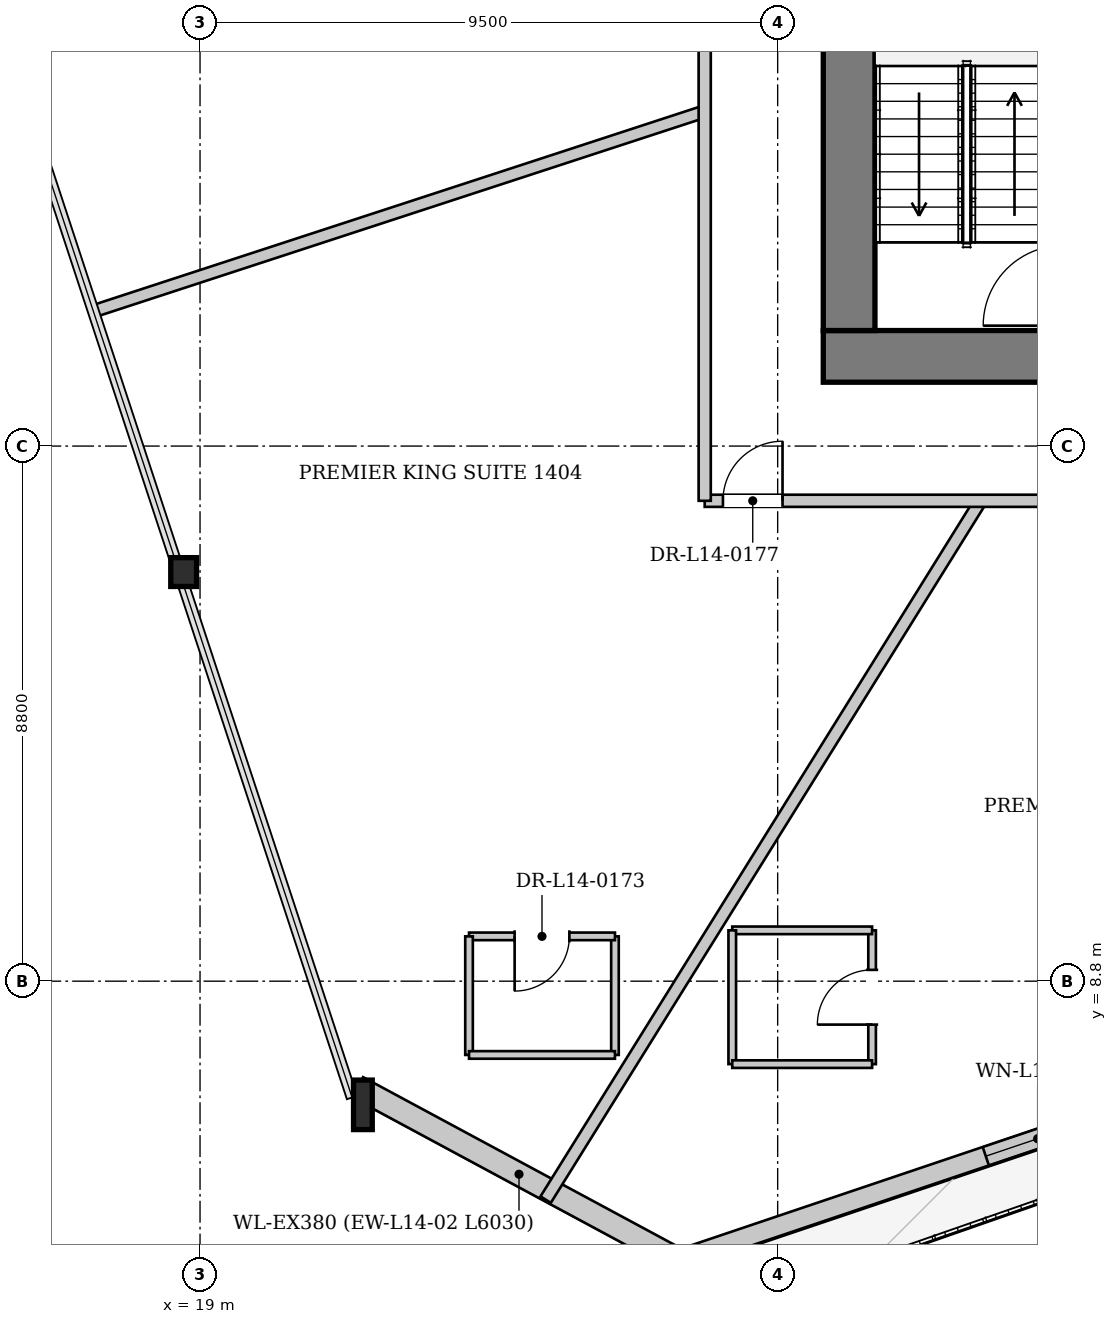
"""IFC4 building model, lengths in metres.
Left out: names, types, materials, properties, quantities, classifications, styles, units other than length and angle.
Written with IfcOpenShell. Run it as: python <this file> out.ifc"""

import sys

from ifc_helpers import new_model, si_unit, direction, frame, frame_2d, origin, origin_2d, place, context, subcontext, project, spatial, rectangle, i_section, extrude, source, transform, mapped, element, fill, save


model = new_model("IFC4")
c1 = context("Model", 3, precision=1e-05, world=origin(), true_north=direction((0.0, 1.0)))
c2 = subcontext(c1, "Body", "Model", "MODEL_VIEW")
j1 = project(units=[si_unit("LENGTHUNIT", "METRE"), si_unit("PLANEANGLEUNIT", "RADIAN")], contexts=[c1])
p1 = place(None, origin())
s1 = spatial("IfcSite", under=j1, at=p1, CompositionType="ELEMENT")
p2 = place(p1, origin())
s2 = spatial("IfcBuilding", under=s1, at=p2, CompositionType="ELEMENT")
p3 = place(p2, frame((0.0, 0.0, 57.7)))
s3 = spatial("IfcBuildingStorey", under=s2, at=p3, CompositionType="ELEMENT", Elevation=57.7)
m1 = source(origin(), c2, "Body", "SweptSolid", [
    extrude(i_section(OverallWidth=0.424, OverallDepth=0.474, WebThickness=0.043, FlangeThickness=0.068, at=origin_2d()), origin(), (0.0, 0.0, 1.0), 3.406),
])
p4 = place(p3, frame((18.609, 15.674, 0.0), z_axis=(0.071104119883, -0.085367950384, 0.993809094939), x_axis=(0.768379900742, 0.639994006328, 0.0)))
e1 = element("IfcColumn", 1, at=p4, inside=s3, PredefinedType="COLUMN", context=c2, shape_type="MappedRepresentation", body=[
    mapped(m1, transform((0.0, 0.0, 0.0), x_axis=(1.0, 0.0, 0.0), y_axis=(0.0, 1.0, 0.0), z_axis=(0.0, 0.0, 1.0), scale=1.0)),
])
m2 = source(origin(), c2, "Body", "SweptSolid", [
    extrude(i_section(OverallWidth=0.308, OverallDepth=0.814, WebThickness=0.021, FlangeThickness=0.04, at=origin_2d()), origin(), (0.0, 0.0, 1.0), 3.412),
])
p5 = place(p3, frame((21.501, 6.887, 0.0), z_axis=(0.103893431056, -0.070764878315, 0.992067783461), x_axis=(0.562948190557, 0.826492186744, 0.0)))
e2 = element("IfcColumn", 2, at=p5, inside=s3, PredefinedType="COLUMN", context=c2, shape_type="MappedRepresentation", body=[
    mapped(m2, transform((0.0, 0.0, 0.0), x_axis=(1.0, 0.0, 0.0), y_axis=(0.0, 1.0, 0.0), z_axis=(0.0, 0.0, 1.0), scale=1.0)),
])
p6 = place(p3, frame((49.898, 11.984, 0.0), z_axis=(0.0, 0.0, 1.0), x_axis=(-0.94755455003, -0.31959407804, 0.0)))
e3 = element("IfcWall", 3, at=p6, inside=s3, PredefinedType="SOLIDWALL", context=c2, shape_type="SweptSolid", body=[
    extrude(rectangle(XDim=24.419, YDim=0.32, at=frame_2d((12.209, 0.0))), origin(), (0.0, 0.0, 1.0), 2.592),
])
p7 = place(p6, frame((7.264, 0.0, 0.0)))
e4 = element("IfcOpeningElement", 4, at=p7, cuts=e3, PredefinedType="OPENING", context=c2, shape_type="SweptSolid", body=[
    extrude(rectangle(XDim=1.1, YDim=2.3, at=frame_2d((0.55, 1.15))), frame((0.0, 0.17, 0.0), z_axis=(0.0, -1.0, 0.0), x_axis=(1.0, 0.0, 0.0)), (0.0, 0.0, 1.0), 0.34),
])
p8 = place(p6, frame((17.17, 0.0, 0.272)))
e5 = element("IfcOpeningElement", 5, at=p8, cuts=e3, PredefinedType="OPENING", context=c2, shape_type="SweptSolid", body=[
    extrude(rectangle(XDim=1.8, YDim=2.2, at=frame_2d((0.9, 1.1))), frame((0.0, 0.17, 0.0), z_axis=(0.0, -1.0, 0.0), x_axis=(1.0, 0.0, 0.0)), (0.0, 0.0, 1.0), 0.34),
])
p9 = place(p3, frame((26.901, 4.196, 0.0), z_axis=(0.0, 0.0, 1.0), x_axis=(-0.880486700223, 0.474070849906, 0.0)))
e6 = element("IfcWall", 6, at=p9, inside=s3, PredefinedType="SOLIDWALL", context=c2, shape_type="SweptSolid", body=[
    extrude(rectangle(XDim=6.03, YDim=0.38, at=frame_2d((3.015, 0.0))), origin(), (0.0, 0.0, 1.0), 2.592),
])
p10 = place(p3, frame((46.75, 19.075, 0.0), z_axis=(0.0, 0.0, 1.0), x_axis=(-1.0, 0.0, 0.0)))
e7 = element("IfcWall", 7, at=p10, inside=s3, PredefinedType="SHEAR", context=c2, shape_type="SweptSolid", body=[
    extrude(rectangle(XDim=17.5, YDim=0.85, at=frame_2d((8.75, 0.0))), origin(), (0.0, 0.0, 1.0), 3.3),
])
p11 = place(p10, frame((4.95, 0.0, 0.0)))
e8 = element("IfcOpeningElement", 8, at=p11, cuts=e7, PredefinedType="OPENING", context=c2, shape_type="SweptSolid", body=[
    extrude(rectangle(XDim=1.12, YDim=2.25, at=frame_2d((0.56, 1.125))), frame((0.0, 0.435, 0.0), z_axis=(0.0, -1.0, 0.0), x_axis=(1.0, 0.0, 0.0)), (0.0, 0.0, 1.0), 0.87),
])
p12 = place(p10, frame((11.45, 0.0, 0.0)))
e9 = element("IfcOpeningElement", 9, at=p12, cuts=e7, PredefinedType="OPENING", context=c2, shape_type="SweptSolid", body=[
    extrude(rectangle(XDim=1.12, YDim=2.25, at=frame_2d((0.56, 1.125))), frame((0.0, 0.435, 0.0), z_axis=(0.0, -1.0, 0.0), x_axis=(1.0, 0.0, 0.0)), (0.0, 0.0, 1.0), 0.87),
])
p13 = place(p3, frame((29.675, 19.5, 0.0), z_axis=(0.0, 0.0, 1.0), x_axis=(0.0, 1.0, 0.0)))
e10 = element("IfcWall", 10, at=p13, inside=s3, PredefinedType="SHEAR", context=c2, shape_type="SweptSolid", body=[
    extrude(rectangle(XDim=14.2, YDim=0.85, at=frame_2d((7.1, 0.0))), origin(), (0.0, 0.0, 1.0), 3.3),
])
p14 = place(p13, frame((7.42, 0.0, 0.0)))
e11 = element("IfcOpeningElement", 11, at=p14, cuts=e10, PredefinedType="OPENING", context=c2, shape_type="SweptSolid", body=[
    extrude(rectangle(XDim=1.6, YDim=2.2, at=frame_2d((0.8, 1.1))), frame((0.0, 0.435, 0.0), z_axis=(0.0, -1.0, 0.0), x_axis=(1.0, 0.0, 0.0)), (0.0, 0.0, 1.0), 0.87),
])
p15 = place(p3, frame((27.3, 23.103, 0.0), z_axis=(0.0, 0.0, 1.0), x_axis=(-0.95051188869, -0.310688186867, 0.0)))
e12 = element("IfcWall", 12, at=p15, inside=s3, PredefinedType="PARTITIONING", context=c2, shape_type="SweptSolid", body=[
    extrude(rectangle(XDim=10.548, YDim=0.2, at=frame_2d((5.274, 0.0))), origin(), (0.0, 0.0, 1.0), 3.3),
])
p16 = place(p3, frame((31.838, 16.7, 0.0), z_axis=(0.0, 0.0, 1.0), x_axis=(-0.528446628654, -0.848966525055, 0.0)))
e13 = element("IfcWall", 13, at=p16, inside=s3, PredefinedType="PARTITIONING", context=c2, shape_type="SweptSolid", body=[
    extrude(rectangle(XDim=13.537, YDim=0.2, at=frame_2d((6.769, 0.0))), origin(), (0.0, 0.0, 1.0), 3.3),
])
p17 = place(p3, frame((25.824, 7.587, 0.0), z_axis=(0.0, 0.0, 1.0), x_axis=(0.0, 1.0, 0.0)))
e14 = element("IfcWall", 14, at=p17, inside=s3, PredefinedType="PARTITIONING", context=c2, shape_type="SweptSolid", body=[
    extrude(rectangle(XDim=1.95, YDim=0.125, at=frame_2d((0.975, 0.0))), origin(), (0.0, 0.0, 1.0), 3.3),
])
p18 = place(p3, frame((25.824, 9.537, 0.0), z_axis=(0.0, 0.0, 1.0), x_axis=(-1.0, 0.0, 0.0)))
e15 = element("IfcWall", 15, at=p18, inside=s3, PredefinedType="PARTITIONING", context=c2, shape_type="SweptSolid", body=[
    extrude(rectangle(XDim=2.4, YDim=0.125, at=frame_2d((1.2, 0.0))), origin(), (0.0, 0.0, 1.0), 3.3),
])
p19 = place(p18, frame((0.75, 0.0, 0.0)))
e16 = element("IfcOpeningElement", 16, at=p19, cuts=e15, PredefinedType="OPENING", context=c2, shape_type="SweptSolid", body=[
    extrude(rectangle(XDim=0.9, YDim=2.1, at=frame_2d((0.45, 1.05))), frame((0.0, 0.073, 0.0), z_axis=(0.0, -1.0, 0.0), x_axis=(1.0, 0.0, 0.0)), (0.0, 0.0, 1.0), 0.145),
])
p20 = place(p3, frame((23.424, 9.537, 0.0), z_axis=(0.0, 0.0, 1.0), x_axis=(0.0, -1.0, 0.0)))
e17 = element("IfcWall", 17, at=p20, inside=s3, PredefinedType="PARTITIONING", context=c2, shape_type="SweptSolid", body=[
    extrude(rectangle(XDim=1.95, YDim=0.125, at=frame_2d((0.975, 0.0))), origin(), (0.0, 0.0, 1.0), 3.3),
])
p21 = place(p3, frame((23.424, 7.587, 0.0), z_axis=(0.0, 0.0, 1.0), x_axis=(1.0, 0.0, 0.0)))
e18 = element("IfcWall", 18, at=p21, inside=s3, PredefinedType="PARTITIONING", context=c2, shape_type="SweptSolid", body=[
    extrude(rectangle(XDim=2.4, YDim=0.125, at=frame_2d((1.2, 0.0))), origin(), (0.0, 0.0, 1.0), 3.3),
])
p22 = place(p3, frame((30.053, 7.436, 0.0), z_axis=(0.0, 0.0, 1.0), x_axis=(0.0, 1.0, 0.0)))
e19 = element("IfcWall", 19, at=p22, inside=s3, PredefinedType="PARTITIONING", context=c2, shape_type="SweptSolid", body=[
    extrude(rectangle(XDim=2.2, YDim=0.125, at=frame_2d((1.1, 0.0))), origin(), (0.0, 0.0, 1.0), 3.3),
])
p23 = place(p22, frame((0.65, 0.0, 0.0)))
e20 = element("IfcOpeningElement", 20, at=p23, cuts=e19, PredefinedType="OPENING", context=c2, shape_type="SweptSolid", body=[
    extrude(rectangle(XDim=0.9, YDim=2.1, at=frame_2d((0.45, 1.05))), frame((0.0, 0.073, 0.0), z_axis=(0.0, -1.0, 0.0), x_axis=(1.0, 0.0, 0.0)), (0.0, 0.0, 1.0), 0.145),
])
p24 = place(p3, frame((30.053, 9.636, 0.0), z_axis=(0.0, 0.0, 1.0), x_axis=(-1.0, 0.0, 0.0)))
e21 = element("IfcWall", 21, at=p24, inside=s3, PredefinedType="PARTITIONING", context=c2, shape_type="SweptSolid", body=[
    extrude(rectangle(XDim=2.3, YDim=0.125, at=frame_2d((1.15, 0.0))), origin(), (0.0, 0.0, 1.0), 3.3),
])
p25 = place(p3, frame((27.753, 9.636, 0.0), z_axis=(0.0, 0.0, 1.0), x_axis=(0.0, -1.0, 0.0)))
e22 = element("IfcWall", 22, at=p25, inside=s3, PredefinedType="PARTITIONING", context=c2, shape_type="SweptSolid", body=[
    extrude(rectangle(XDim=2.2, YDim=0.125, at=frame_2d((1.1, 0.0))), origin(), (0.0, 0.0, 1.0), 3.3),
])
p26 = place(p3, frame((27.753, 7.436, 0.0), z_axis=(0.0, 0.0, 1.0), x_axis=(1.0, 0.0, 0.0)))
e23 = element("IfcWall", 23, at=p26, inside=s3, PredefinedType="PARTITIONING", context=c2, shape_type="SweptSolid", body=[
    extrude(rectangle(XDim=2.3, YDim=0.125, at=frame_2d((1.15, 0.0))), origin(), (0.0, 0.0, 1.0), 3.3),
])
p27 = place(p3, frame((27.3, 16.7, 0.0), z_axis=(0.0, 0.0, 1.0), x_axis=(1.0, 0.0, 0.0)))
e24 = element("IfcWall", 24, at=p27, inside=s3, PredefinedType="PARTITIONING", context=c2, shape_type="SweptSolid", body=[
    extrude(rectangle(XDim=21.4, YDim=0.2, at=frame_2d((10.7, 0.0))), origin(), (0.0, 0.0, 1.0), 3.3),
])
p28 = place(p27, frame((0.3, 0.0, 0.0)))
e25 = element("IfcOpeningElement", 25, at=p28, cuts=e24, PredefinedType="OPENING", context=c2, shape_type="SweptSolid", body=[
    extrude(rectangle(XDim=0.98, YDim=2.15, at=frame_2d((0.49, 1.075))), frame((0.0, 0.11, 0.0), z_axis=(0.0, -1.0, 0.0), x_axis=(1.0, 0.0, 0.0)), (0.0, 0.0, 1.0), 0.22),
])
p29 = place(p27, frame((6.983, 0.0, 0.0)))
e26 = element("IfcOpeningElement", 26, at=p29, cuts=e24, PredefinedType="OPENING", context=c2, shape_type="SweptSolid", body=[
    extrude(rectangle(XDim=0.98, YDim=2.15, at=frame_2d((0.49, 1.075))), frame((0.0, 0.11, 0.0), z_axis=(0.0, -1.0, 0.0), x_axis=(1.0, 0.0, 0.0)), (0.0, 0.0, 1.0), 0.22),
])
p30 = place(p27, frame((18.929, 0.0, 0.0)))
e27 = element("IfcOpeningElement", 27, at=p30, cuts=e24, PredefinedType="OPENING", context=c2, shape_type="SweptSolid", body=[
    extrude(rectangle(XDim=0.98, YDim=2.15, at=frame_2d((0.49, 1.075))), frame((0.0, 0.11, 0.0), z_axis=(0.0, -1.0, 0.0), x_axis=(1.0, 0.0, 0.0)), (0.0, 0.0, 1.0), 0.22),
])
p31 = place(p3, frame((27.3, 16.7, 0.0), z_axis=(0.0, 0.0, 1.0), x_axis=(0.0, 1.0, 0.0)))
e28 = element("IfcWall", 28, at=p31, inside=s3, PredefinedType="PARTITIONING", context=c2, shape_type="SweptSolid", body=[
    extrude(rectangle(XDim=19.8, YDim=0.2, at=frame_2d((9.9, 0.0))), origin(), (0.0, 0.0, 1.0), 3.3),
])
p32 = place(p31, frame((10.32, 0.0, 0.0)))
e29 = element("IfcOpeningElement", 29, at=p32, cuts=e28, PredefinedType="OPENING", context=c2, shape_type="SweptSolid", body=[
    extrude(rectangle(XDim=0.98, YDim=2.15, at=frame_2d((0.49, 1.075))), frame((0.0, 0.11, 0.0), z_axis=(0.0, -1.0, 0.0), x_axis=(1.0, 0.0, 0.0)), (0.0, 0.0, 1.0), 0.22),
])
m3 = source(origin(), c2, "Body", "SweptSolid", [
    extrude(rectangle(XDim=1.8, YDim=2.2, at=frame_2d((0.9, 1.1))), frame((0.0, 0.03, 0.0), z_axis=(0.0, -1.0, 0.0), x_axis=(1.0, 0.0, 0.0)), (0.0, 0.0, 1.0), 0.06),
])
p33 = place(p8, origin())
e30 = element("IfcWindow", 30, at=p33, inside=s3, PartitioningType="SINGLE_PANEL", PredefinedType="WINDOW", context=c2, shape_type="MappedRepresentation", body=[
    mapped(m3, transform((0.0, 0.0, 0.0), x_axis=(1.0, 0.0, 0.0), y_axis=(0.0, 1.0, 0.0), z_axis=(0.0, 0.0, 1.0), scale=1.0)),
])
fill(e5, e30)
m4 = source(origin(), c2, "Body", "SweptSolid", [
    extrude(rectangle(XDim=0.9, YDim=2.1, at=frame_2d((0.45, 1.05))), frame((0.0, 0.025, 0.0), z_axis=(0.0, -1.0, 0.0), x_axis=(1.0, 0.0, 0.0)), (0.0, 0.0, 1.0), 0.05),
])
p34 = place(p19, origin())
e31 = element("IfcDoor", 31, at=p34, inside=s3, OperationType="SINGLE_SWING_RIGHT", PredefinedType="DOOR", context=c2, shape_type="MappedRepresentation", body=[
    mapped(m4, transform((0.0, 0.0, 0.0), x_axis=(1.0, 0.0, 0.0), y_axis=(0.0, 1.0, 0.0), z_axis=(0.0, 0.0, 1.0), scale=1.0)),
])
fill(e16, e31)
p35 = place(p23, origin())
e32 = element("IfcDoor", 32, at=p35, inside=s3, OperationType="SINGLE_SWING_LEFT", PredefinedType="DOOR", context=c2, shape_type="MappedRepresentation", body=[
    mapped(m4, transform((0.0, 0.0, 0.0), x_axis=(1.0, 0.0, 0.0), y_axis=(0.0, 1.0, 0.0), z_axis=(0.0, 0.0, 1.0), scale=1.0)),
])
fill(e20, e32)
m5 = source(origin(), c2, "Body", "SweptSolid", [
    extrude(rectangle(XDim=0.98, YDim=2.15, at=frame_2d((0.49, 1.075))), frame((0.0, 0.025, 0.0), z_axis=(0.0, -1.0, 0.0), x_axis=(1.0, 0.0, 0.0)), (0.0, 0.0, 1.0), 0.05),
])
p36 = place(p28, origin())
e33 = element("IfcDoor", 33, at=p36, inside=s3, OperationType="SINGLE_SWING_RIGHT", PredefinedType="DOOR", context=c2, shape_type="MappedRepresentation", body=[
    mapped(m5, transform((0.0, 0.0, 0.0), x_axis=(1.0, 0.0, 0.0), y_axis=(0.0, 1.0, 0.0), z_axis=(0.0, 0.0, 1.0), scale=1.0)),
])
fill(e25, e33)
save(model, sys.argv[1])
